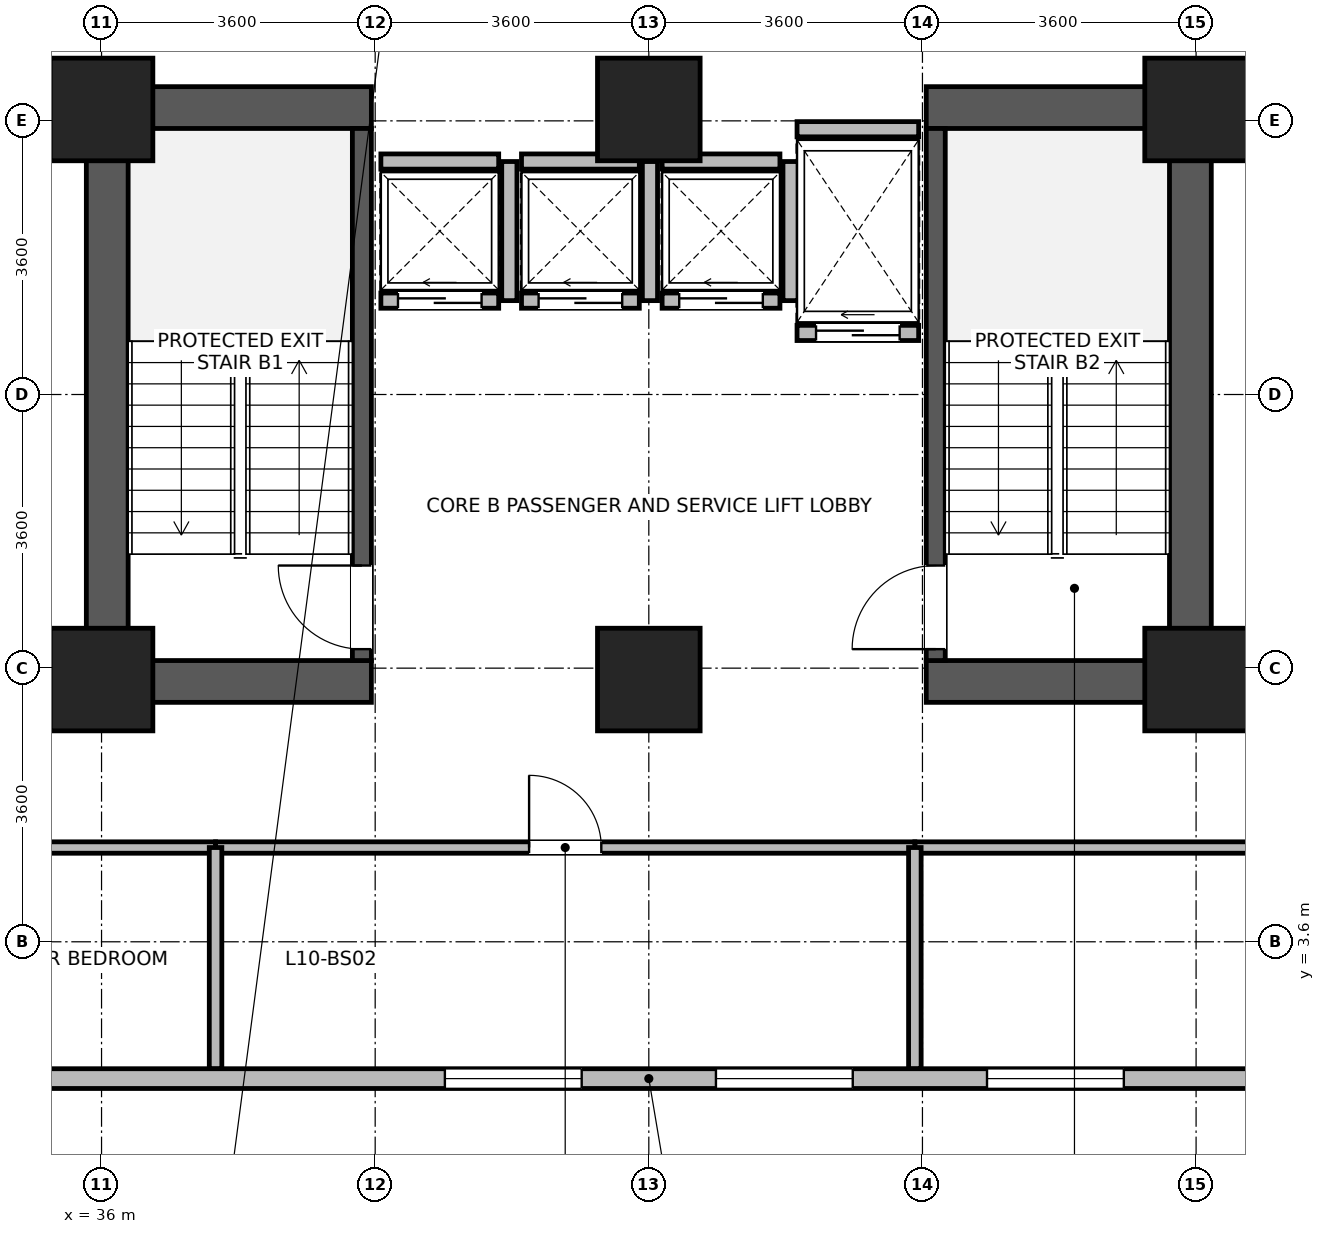
"""IFC4 building model, lengths in metres.
Left out: names, types, materials, properties, quantities, classifications, styles, units other than length and angle.
Written with IfcOpenShell. Run it as: python <this file> out.ifc"""

import sys

from ifc_helpers import new_model, si_unit, direction, frame, frame_2d, origin, origin_2d, place, context, subcontext, project, spatial, rectangle, extrude, source, transform, mapped, element, fill, save


model = new_model("IFC4")
c1 = context("Model", 3, precision=1e-05, world=origin(), true_north=direction((0.0, 1.0)))
c2 = subcontext(c1, "Body", "Model", "MODEL_VIEW")
j1 = project(units=[si_unit("LENGTHUNIT", "METRE"), si_unit("PLANEANGLEUNIT", "RADIAN")], contexts=[c1])
p1 = place(None, origin())
s1 = spatial("IfcSite", under=j1, at=p1, CompositionType="ELEMENT")
p2 = place(p1, origin())
s2 = spatial("IfcBuilding", under=s1, at=p2, CompositionType="ELEMENT")
p3 = place(p2, frame((0.0, 0.0, 43.8)))
s3 = spatial("IfcBuildingStorey", under=s2, at=p3, CompositionType="ELEMENT", Elevation=43.8)
for number, where, z_axis, x_axis in (
    (1, (36.075, 6.75, 0.0), (0.0, 0.0, 1.0), (0.0, 1.0, 0.0)),
    (2, (50.325, 6.75, 0.0), (0.0, 0.0, 1.0), (0.0, 1.0, 0.0)),
):
    element("IfcWall", number, at=place(p3, frame(where, z_axis=z_axis, x_axis=x_axis)), inside=s3, PredefinedType="SHEAR", context=c2, shape_type="SweptSolid", body=[
        extrude(rectangle(XDim=8.1, YDim=0.55, at=frame_2d((4.05, 0.0))), origin(), (0.0, 0.0, 1.0), 3.45),
    ])
for number, where, z_axis, x_axis in (
    (3, (36.35, 7.025, 0.0), (0.0, 0.0, 1.0), (1.0, 0.0, 0.0)),
    (4, (46.85, 7.025, 0.0), (0.0, 0.0, 1.0), (1.0, 0.0, 0.0)),
    (5, (36.35, 14.575, 0.0), (0.0, 0.0, 1.0), (1.0, 0.0, 0.0)),
    (6, (46.85, 14.575, 0.0), (0.0, 0.0, 1.0), (1.0, 0.0, 0.0)),
):
    element("IfcWall", number, at=place(p3, frame(where, z_axis=z_axis, x_axis=x_axis)), inside=s3, PredefinedType="SHEAR", context=c2, shape_type="SweptSolid", body=[
        extrude(rectangle(XDim=3.2, YDim=0.55, at=frame_2d((1.6, 0.0))), origin(), (0.0, 0.0, 1.0), 3.45),
    ])
p4 = place(p3, frame((39.425, 7.3, 0.0), z_axis=(0.0, 0.0, 1.0), x_axis=(0.0, 1.0, 0.0)))
e7 = element("IfcWall", 7, at=p4, inside=s3, PredefinedType="SHEAR", context=c2, shape_type="SweptSolid", body=[
    extrude(rectangle(XDim=7.0, YDim=0.25, at=frame_2d((3.5, 0.0))), origin(), (0.0, 0.0, 1.0), 3.45),
])
p5 = place(p4, frame((0.15, 0.0, 0.0)))
e8 = element("IfcOpeningElement", 8, at=p5, cuts=e7, PredefinedType="OPENING", context=c2, shape_type="SweptSolid", body=[
    extrude(rectangle(XDim=1.1, YDim=2.08, at=frame_2d((0.55, 1.04))), frame((0.0, 0.135, 0.0), z_axis=(0.0, -1.0, 0.0), x_axis=(1.0, 0.0, 0.0)), (0.0, 0.0, 1.0), 0.27),
])
p6 = place(p3, frame((46.975, 7.3, 0.0), z_axis=(0.0, 0.0, 1.0), x_axis=(0.0, 1.0, 0.0)))
e9 = element("IfcWall", 9, at=p6, inside=s3, PredefinedType="SHEAR", context=c2, shape_type="SweptSolid", body=[
    extrude(rectangle(XDim=7.0, YDim=0.25, at=frame_2d((3.5, 0.0))), origin(), (0.0, 0.0, 1.0), 3.45),
])
p7 = place(p6, frame((0.15, 0.0, 0.0)))
e10 = element("IfcOpeningElement", 10, at=p7, cuts=e9, PredefinedType="OPENING", context=c2, shape_type="SweptSolid", body=[
    extrude(rectangle(XDim=1.1, YDim=2.08, at=frame_2d((0.55, 1.04))), frame((0.0, 0.135, 0.0), z_axis=(0.0, -1.0, 0.0), x_axis=(1.0, 0.0, 0.0)), (0.0, 0.0, 1.0), 0.27),
])
m1 = source(origin(), c2, "Body", "SweptSolid", [
    extrude(rectangle(XDim=1.35, YDim=1.35, at=origin_2d()), origin(), (0.0, 0.0, 1.0), 3.7),
])
for number, where, z_axis, x_axis in (
    (11, (36.0, 7.05, 0.0), (0.0, 0.0, 1.0), (1.0, 0.0, 0.0)),
    (12, (36.0, 14.55, 0.0), (0.0, 0.0, 1.0), (1.0, 0.0, 0.0)),
    (13, (43.2, 7.05, 0.0), (0.0, 0.0, 1.0), (1.0, 0.0, 0.0)),
    (14, (43.2, 14.55, 0.0), (0.0, 0.0, 1.0), (1.0, 0.0, 0.0)),
    (15, (50.4, 7.05, 0.0), (0.0, 0.0, 1.0), (1.0, 0.0, 0.0)),
    (16, (50.4, 14.55, 0.0), (0.0, 0.0, 1.0), (1.0, 0.0, 0.0)),
):
    element("IfcColumn", number, at=place(p3, frame(where, z_axis=z_axis, x_axis=x_axis)), inside=s3, PredefinedType="COLUMN", context=c2, shape_type="MappedRepresentation", body=[
        mapped(m1, transform((0.0, 0.0, 0.0), x_axis=(1.0, 0.0, 0.0), y_axis=(0.0, 1.0, 0.0), z_axis=(0.0, 0.0, 1.0), scale=1.0)),
    ])
p8 = place(p3, frame((57.465, 1.8, 0.0), z_axis=(0.0, 0.0, 1.0), x_axis=(-1.0, 0.0, 0.0)))
e17 = element("IfcWall", 17, at=p8, inside=s3, PredefinedType="STANDARD", context=c2, shape_type="SweptSolid", body=[
    extrude(rectangle(XDim=28.53, YDim=0.26, at=frame_2d((14.265, 0.0))), origin(), (0.0, 0.0, 1.0), 3.43),
])
p9 = place(p8, frame((0.883, 0.0, 0.85)))
e18 = element("IfcOpeningElement", 18, at=p9, cuts=e17, PredefinedType="OPENING", context=c2, shape_type="SweptSolid", body=[
    extrude(rectangle(XDim=1.8, YDim=1.85, at=frame_2d((0.9, 0.925))), frame((0.0, 0.14, 0.0), z_axis=(0.0, -1.0, 0.0), x_axis=(1.0, 0.0, 0.0)), (0.0, 0.0, 1.0), 0.28),
])
p10 = place(p8, frame((4.449, 0.0, 0.85)))
e19 = element("IfcOpeningElement", 19, at=p10, cuts=e17, PredefinedType="OPENING", context=c2, shape_type="SweptSolid", body=[
    extrude(rectangle(XDim=1.8, YDim=1.85, at=frame_2d((0.9, 0.925))), frame((0.0, 0.14, 0.0), z_axis=(0.0, -1.0, 0.0), x_axis=(1.0, 0.0, 0.0)), (0.0, 0.0, 1.0), 0.28),
])
p11 = place(p8, frame((8.016, 0.0, 0.85)))
e20 = element("IfcOpeningElement", 20, at=p11, cuts=e17, PredefinedType="OPENING", context=c2, shape_type="SweptSolid", body=[
    extrude(rectangle(XDim=1.8, YDim=1.85, at=frame_2d((0.9, 0.925))), frame((0.0, 0.14, 0.0), z_axis=(0.0, -1.0, 0.0), x_axis=(1.0, 0.0, 0.0)), (0.0, 0.0, 1.0), 0.28),
])
p12 = place(p8, frame((11.582, 0.0, 0.85)))
e21 = element("IfcOpeningElement", 21, at=p12, cuts=e17, PredefinedType="OPENING", context=c2, shape_type="SweptSolid", body=[
    extrude(rectangle(XDim=1.8, YDim=1.85, at=frame_2d((0.9, 0.925))), frame((0.0, 0.14, 0.0), z_axis=(0.0, -1.0, 0.0), x_axis=(1.0, 0.0, 0.0)), (0.0, 0.0, 1.0), 0.28),
])
p13 = place(p8, frame((15.148, 0.0, 0.85)))
e22 = element("IfcOpeningElement", 22, at=p13, cuts=e17, PredefinedType="OPENING", context=c2, shape_type="SweptSolid", body=[
    extrude(rectangle(XDim=1.8, YDim=1.85, at=frame_2d((0.9, 0.925))), frame((0.0, 0.14, 0.0), z_axis=(0.0, -1.0, 0.0), x_axis=(1.0, 0.0, 0.0)), (0.0, 0.0, 1.0), 0.28),
])
p14 = place(p8, frame((22.281, 0.0, 0.85)))
e23 = element("IfcOpeningElement", 23, at=p14, cuts=e17, PredefinedType="OPENING", context=c2, shape_type="SweptSolid", body=[
    extrude(rectangle(XDim=1.8, YDim=1.85, at=frame_2d((0.9, 0.925))), frame((0.0, 0.14, 0.0), z_axis=(0.0, -1.0, 0.0), x_axis=(1.0, 0.0, 0.0)), (0.0, 0.0, 1.0), 0.28),
])
p15 = place(p8, frame((25.847, 0.0, 0.85)))
e24 = element("IfcOpeningElement", 24, at=p15, cuts=e17, PredefinedType="OPENING", context=c2, shape_type="SweptSolid", body=[
    extrude(rectangle(XDim=1.8, YDim=1.85, at=frame_2d((0.9, 0.925))), frame((0.0, 0.14, 0.0), z_axis=(0.0, -1.0, 0.0), x_axis=(1.0, 0.0, 0.0)), (0.0, 0.0, 1.0), 0.28),
])
p16 = place(p3, frame((39.675, 12.035, 0.0), z_axis=(0.0, 0.0, 1.0), x_axis=(1.0, 0.0, 0.0)))
e25 = element("IfcWall", 25, at=p16, inside=s3, PredefinedType="PARTITIONING", context=c2, shape_type="SweptSolid", body=[
    extrude(rectangle(XDim=1.55, YDim=0.2, at=frame_2d((0.775, 0.0))), origin(), (0.0, 0.0, 1.0), 3.43),
])
p17 = place(p16, frame((0.225, 0.0, 0.0)))
e26 = element("IfcOpeningElement", 26, at=p17, cuts=e25, PredefinedType="OPENING", context=c2, shape_type="SweptSolid", body=[
    extrude(rectangle(XDim=1.1, YDim=2.12, at=frame_2d((0.55, 1.06))), frame((0.0, 0.11, 0.0), z_axis=(0.0, -1.0, 0.0), x_axis=(1.0, 0.0, 0.0)), (0.0, 0.0, 1.0), 0.22),
])
p18 = place(p3, frame((39.675, 13.865, 0.0), z_axis=(0.0, 0.0, 1.0), x_axis=(1.0, 0.0, 0.0)))
e27 = element("IfcWall", 27, at=p18, inside=s3, PredefinedType="PARTITIONING", context=c2, shape_type="SweptSolid", body=[
    extrude(rectangle(XDim=1.55, YDim=0.2, at=frame_2d((0.775, 0.0))), origin(), (0.0, 0.0, 1.0), 3.43),
])
p19 = place(p3, frame((41.365, 12.035, 0.0), z_axis=(0.0, 0.0, 1.0), x_axis=(0.0, 1.0, 0.0)))
e28 = element("IfcWall", 28, at=p19, inside=s3, PredefinedType="PARTITIONING", context=c2, shape_type="SweptSolid", body=[
    extrude(rectangle(XDim=1.83, YDim=0.2, at=frame_2d((0.915, 0.0))), origin(), (0.0, 0.0, 1.0), 3.43),
])
p20 = place(p3, frame((41.525, 12.035, 0.0), z_axis=(0.0, 0.0, 1.0), x_axis=(1.0, 0.0, 0.0)))
e29 = element("IfcWall", 29, at=p20, inside=s3, PredefinedType="PARTITIONING", context=c2, shape_type="SweptSolid", body=[
    extrude(rectangle(XDim=1.55, YDim=0.2, at=frame_2d((0.775, 0.0))), origin(), (0.0, 0.0, 1.0), 3.43),
])
p21 = place(p20, frame((0.225, 0.0, 0.0)))
e30 = element("IfcOpeningElement", 30, at=p21, cuts=e29, PredefinedType="OPENING", context=c2, shape_type="SweptSolid", body=[
    extrude(rectangle(XDim=1.1, YDim=2.12, at=frame_2d((0.55, 1.06))), frame((0.0, 0.11, 0.0), z_axis=(0.0, -1.0, 0.0), x_axis=(1.0, 0.0, 0.0)), (0.0, 0.0, 1.0), 0.22),
])
p22 = place(p3, frame((41.525, 13.865, 0.0), z_axis=(0.0, 0.0, 1.0), x_axis=(1.0, 0.0, 0.0)))
e31 = element("IfcWall", 31, at=p22, inside=s3, PredefinedType="PARTITIONING", context=c2, shape_type="SweptSolid", body=[
    extrude(rectangle(XDim=1.55, YDim=0.2, at=frame_2d((0.775, 0.0))), origin(), (0.0, 0.0, 1.0), 3.43),
])
p23 = place(p3, frame((43.215, 12.035, 0.0), z_axis=(0.0, 0.0, 1.0), x_axis=(0.0, 1.0, 0.0)))
e32 = element("IfcWall", 32, at=p23, inside=s3, PredefinedType="PARTITIONING", context=c2, shape_type="SweptSolid", body=[
    extrude(rectangle(XDim=1.83, YDim=0.2, at=frame_2d((0.915, 0.0))), origin(), (0.0, 0.0, 1.0), 3.43),
])
p24 = place(p3, frame((43.375, 12.035, 0.0), z_axis=(0.0, 0.0, 1.0), x_axis=(1.0, 0.0, 0.0)))
e33 = element("IfcWall", 33, at=p24, inside=s3, PredefinedType="PARTITIONING", context=c2, shape_type="SweptSolid", body=[
    extrude(rectangle(XDim=1.55, YDim=0.2, at=frame_2d((0.775, 0.0))), origin(), (0.0, 0.0, 1.0), 3.43),
])
p25 = place(p24, frame((0.225, 0.0, 0.0)))
e34 = element("IfcOpeningElement", 34, at=p25, cuts=e33, PredefinedType="OPENING", context=c2, shape_type="SweptSolid", body=[
    extrude(rectangle(XDim=1.1, YDim=2.12, at=frame_2d((0.55, 1.06))), frame((0.0, 0.11, 0.0), z_axis=(0.0, -1.0, 0.0), x_axis=(1.0, 0.0, 0.0)), (0.0, 0.0, 1.0), 0.22),
])
p26 = place(p3, frame((43.375, 13.865, 0.0), z_axis=(0.0, 0.0, 1.0), x_axis=(1.0, 0.0, 0.0)))
e35 = element("IfcWall", 35, at=p26, inside=s3, PredefinedType="PARTITIONING", context=c2, shape_type="SweptSolid", body=[
    extrude(rectangle(XDim=1.55, YDim=0.2, at=frame_2d((0.775, 0.0))), origin(), (0.0, 0.0, 1.0), 3.43),
])
p27 = place(p3, frame((45.065, 12.035, 0.0), z_axis=(0.0, 0.0, 1.0), x_axis=(0.0, 1.0, 0.0)))
e36 = element("IfcWall", 36, at=p27, inside=s3, PredefinedType="PARTITIONING", context=c2, shape_type="SweptSolid", body=[
    extrude(rectangle(XDim=1.83, YDim=0.2, at=frame_2d((0.915, 0.0))), origin(), (0.0, 0.0, 1.0), 3.43),
])
p28 = place(p3, frame((45.15, 11.61, 0.0), z_axis=(0.0, 0.0, 1.0), x_axis=(1.0, 0.0, 0.0)))
e37 = element("IfcWall", 37, at=p28, inside=s3, PredefinedType="PARTITIONING", context=c2, shape_type="SweptSolid", body=[
    extrude(rectangle(XDim=1.6, YDim=0.2, at=frame_2d((0.8, 0.0))), origin(), (0.0, 0.0, 1.0), 3.43),
])
p29 = place(p28, frame((0.25, 0.0, 0.0)))
e38 = element("IfcOpeningElement", 38, at=p29, cuts=e37, PredefinedType="OPENING", context=c2, shape_type="SweptSolid", body=[
    extrude(rectangle(XDim=1.1, YDim=2.12, at=frame_2d((0.55, 1.06))), frame((0.0, 0.11, 0.0), z_axis=(0.0, -1.0, 0.0), x_axis=(1.0, 0.0, 0.0)), (0.0, 0.0, 1.0), 0.22),
])
p30 = place(p3, frame((45.15, 14.29, 0.0), z_axis=(0.0, 0.0, 1.0), x_axis=(1.0, 0.0, 0.0)))
e39 = element("IfcWall", 39, at=p30, inside=s3, PredefinedType="PARTITIONING", context=c2, shape_type="SweptSolid", body=[
    extrude(rectangle(XDim=1.6, YDim=0.2, at=frame_2d((0.8, 0.0))), origin(), (0.0, 0.0, 1.0), 2.23),
])
p31 = place(p3, frame((46.7, 4.84, 0.0), z_axis=(0.0, 0.0, 1.0), x_axis=(1.0, 0.0, 0.0)))
e40 = element("IfcWall", 40, at=p31, inside=s3, PredefinedType="PARTITIONING", context=c2, shape_type="SweptSolid", body=[
    extrude(rectangle(XDim=10.768, YDim=0.15, at=frame_2d((5.384, 0.0))), origin(), (0.0, 0.0, 1.0), 3.43),
])
p32 = place(p31, frame((4.734, 0.0, 0.0)))
e41 = element("IfcOpeningElement", 41, at=p32, cuts=e40, PredefinedType="OPENING", context=c2, shape_type="SweptSolid", body=[
    extrude(rectangle(XDim=1.3, YDim=2.12, at=frame_2d((0.65, 1.06))), frame((0.0, 0.085, 0.0), z_axis=(0.0, -1.0, 0.0), x_axis=(1.0, 0.0, 0.0)), (0.0, 0.0, 1.0), 0.17),
])
p33 = place(p3, frame((37.5, 4.84, 0.0), z_axis=(0.0, 0.0, 1.0), x_axis=(1.0, 0.0, 0.0)))
e42 = element("IfcWall", 42, at=p33, inside=s3, PredefinedType="PARTITIONING", context=c2, shape_type="SweptSolid", body=[
    extrude(rectangle(XDim=9.2, YDim=0.15, at=frame_2d((4.6, 0.0))), origin(), (0.0, 0.0, 1.0), 3.43),
])
p34 = place(p33, frame((4.125, 0.0, 0.0)))
e43 = element("IfcOpeningElement", 43, at=p34, cuts=e42, PredefinedType="OPENING", context=c2, shape_type="SweptSolid", body=[
    extrude(rectangle(XDim=0.95, YDim=2.1, at=frame_2d((0.475, 1.05))), frame((0.0, 0.085, 0.0), z_axis=(0.0, -1.0, 0.0), x_axis=(1.0, 0.0, 0.0)), (0.0, 0.0, 1.0), 0.17),
])
p35 = place(p3, frame((28.932, 4.84, 0.0), z_axis=(0.0, 0.0, 1.0), x_axis=(1.0, 0.0, 0.0)))
e44 = element("IfcWall", 44, at=p35, inside=s3, PredefinedType="PARTITIONING", context=c2, shape_type="SweptSolid", body=[
    extrude(rectangle(XDim=8.568, YDim=0.15, at=frame_2d((4.284, 0.0))), origin(), (0.0, 0.0, 1.0), 3.43),
])
p36 = place(p35, frame((3.809, 0.0, 0.0)))
e45 = element("IfcOpeningElement", 45, at=p36, cuts=e44, PredefinedType="OPENING", context=c2, shape_type="SweptSolid", body=[
    extrude(rectangle(XDim=0.95, YDim=2.1, at=frame_2d((0.475, 1.05))), frame((0.0, 0.085, 0.0), z_axis=(0.0, -1.0, 0.0), x_axis=(1.0, 0.0, 0.0)), (0.0, 0.0, 1.0), 0.17),
])
for number, where, z_axis, x_axis in (
    (46, (37.5, 1.932, 0.0), (0.0, 0.0, 1.0), (0.0, 1.0, 0.0)),
    (47, (46.7, 1.932, 0.0), (0.0, 0.0, 1.0), (0.0, 1.0, 0.0)),
):
    element("IfcWall", number, at=place(p3, frame(where, z_axis=z_axis, x_axis=x_axis)), inside=s3, PredefinedType="PARTITIONING", context=c2, shape_type="SweptSolid", body=[
        extrude(rectangle(XDim=2.908, YDim=0.165, at=frame_2d((1.454, 0.0))), origin(), (0.0, 0.0, 1.0), 3.43),
    ])
p37 = place(p11, origin())
e48 = element("IfcWindow", 48, at=p37, inside=s3, PartitioningType="SINGLE_PANEL", PredefinedType="WINDOW", context=c2, shape_type="SweptSolid", body=[
    extrude(rectangle(XDim=1.8, YDim=1.85, at=frame_2d((0.9, 0.925))), frame((0.0, 0.03, 0.0), z_axis=(0.0, -1.0, 0.0), x_axis=(1.0, 0.0, 0.0)), (0.0, 0.0, 1.0), 0.06),
])
fill(e20, e48)
p38 = place(p12, origin())
e49 = element("IfcWindow", 49, at=p38, inside=s3, PartitioningType="SINGLE_PANEL", PredefinedType="WINDOW", context=c2, shape_type="SweptSolid", body=[
    extrude(rectangle(XDim=1.8, YDim=1.85, at=frame_2d((0.9, 0.925))), frame((0.0, 0.03, 0.0), z_axis=(0.0, -1.0, 0.0), x_axis=(1.0, 0.0, 0.0)), (0.0, 0.0, 1.0), 0.06),
])
fill(e21, e49)
p39 = place(p13, origin())
e50 = element("IfcWindow", 50, at=p39, inside=s3, PartitioningType="SINGLE_PANEL", PredefinedType="WINDOW", context=c2, shape_type="SweptSolid", body=[
    extrude(rectangle(XDim=1.8, YDim=1.85, at=frame_2d((0.9, 0.925))), frame((0.0, 0.03, 0.0), z_axis=(0.0, -1.0, 0.0), x_axis=(1.0, 0.0, 0.0)), (0.0, 0.0, 1.0), 0.06),
])
fill(e22, e50)
p40 = place(p5, origin())
e51 = element("IfcDoor", 51, at=p40, inside=s3, OperationType="SINGLE_SWING_RIGHT", PredefinedType="DOOR", context=c2, shape_type="SweptSolid", body=[
    extrude(rectangle(XDim=1.1, YDim=2.08, at=frame_2d((0.55, 1.04))), frame((0.0, 0.025, 0.0), z_axis=(0.0, -1.0, 0.0), x_axis=(1.0, 0.0, 0.0)), (0.0, 0.0, 1.0), 0.05),
])
fill(e8, e51)
p41 = place(p7, origin())
e52 = element("IfcDoor", 52, at=p41, inside=s3, OperationType="SINGLE_SWING_LEFT", PredefinedType="DOOR", context=c2, shape_type="SweptSolid", body=[
    extrude(rectangle(XDim=1.1, YDim=2.08, at=frame_2d((0.55, 1.04))), frame((0.0, 0.025, 0.0), z_axis=(0.0, -1.0, 0.0), x_axis=(1.0, 0.0, 0.0)), (0.0, 0.0, 1.0), 0.05),
])
fill(e10, e52)
p42 = place(p17, origin())
e53 = element("IfcDoor", 53, at=p42, inside=s3, OperationType="SLIDING_TO_LEFT", PredefinedType="DOOR", context=c2, shape_type="SweptSolid", body=[
    extrude(rectangle(XDim=1.1, YDim=2.12, at=frame_2d((0.55, 1.06))), frame((0.0, 0.025, 0.0), z_axis=(0.0, -1.0, 0.0), x_axis=(1.0, 0.0, 0.0)), (0.0, 0.0, 1.0), 0.05),
])
fill(e26, e53)
p43 = place(p21, origin())
e54 = element("IfcDoor", 54, at=p43, inside=s3, OperationType="SLIDING_TO_LEFT", PredefinedType="DOOR", context=c2, shape_type="SweptSolid", body=[
    extrude(rectangle(XDim=1.1, YDim=2.12, at=frame_2d((0.55, 1.06))), frame((0.0, 0.025, 0.0), z_axis=(0.0, -1.0, 0.0), x_axis=(1.0, 0.0, 0.0)), (0.0, 0.0, 1.0), 0.05),
])
fill(e30, e54)
p44 = place(p25, origin())
e55 = element("IfcDoor", 55, at=p44, inside=s3, OperationType="SLIDING_TO_LEFT", PredefinedType="DOOR", context=c2, shape_type="SweptSolid", body=[
    extrude(rectangle(XDim=1.1, YDim=2.12, at=frame_2d((0.55, 1.06))), frame((0.0, 0.025, 0.0), z_axis=(0.0, -1.0, 0.0), x_axis=(1.0, 0.0, 0.0)), (0.0, 0.0, 1.0), 0.05),
])
fill(e34, e55)
p45 = place(p29, origin())
e56 = element("IfcDoor", 56, at=p45, inside=s3, OperationType="SLIDING_TO_LEFT", PredefinedType="DOOR", context=c2, shape_type="SweptSolid", body=[
    extrude(rectangle(XDim=1.1, YDim=2.12, at=frame_2d((0.55, 1.06))), frame((0.0, 0.025, 0.0), z_axis=(0.0, -1.0, 0.0), x_axis=(1.0, 0.0, 0.0)), (0.0, 0.0, 1.0), 0.05),
])
fill(e38, e56)
p46 = place(p34, origin())
e57 = element("IfcDoor", 57, at=p46, inside=s3, OperationType="SINGLE_SWING_LEFT", PredefinedType="DOOR", context=c2, shape_type="SweptSolid", body=[
    extrude(rectangle(XDim=0.95, YDim=2.1, at=frame_2d((0.475, 1.05))), frame((0.0, 0.025, 0.0), z_axis=(0.0, -1.0, 0.0), x_axis=(1.0, 0.0, 0.0)), (0.0, 0.0, 1.0), 0.05),
])
fill(e43, e57)
save(model, sys.argv[1])
